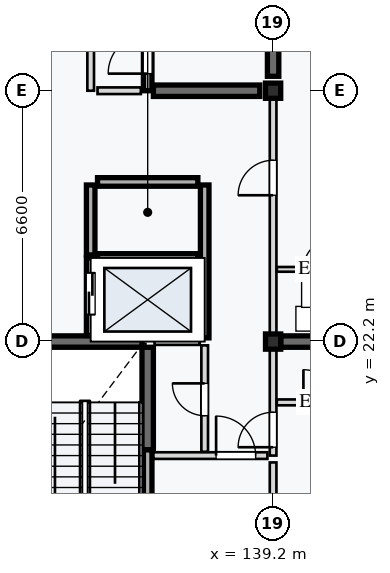
"""IFC4 building model, lengths in metres.
Left out: names, types, materials, properties, quantities, classifications, styles, units other than length and angle.
Written with IfcOpenShell. Run it as: python <this file> out.ifc"""

import sys

from ifc_helpers import new_model, si_unit, direction, frame, frame_2d, origin, origin_2d, place, context, subcontext, project, spatial, rectangle, extrude, element, fill, save


model = new_model("IFC4")
c1 = context("Model", 3, precision=1e-05, world=origin(), true_north=direction((0.0, 1.0)))
c2 = subcontext(c1, "Body", "Model", "MODEL_VIEW")
j1 = project(units=[si_unit("LENGTHUNIT", "METRE"), si_unit("PLANEANGLEUNIT", "RADIAN")], contexts=[c1])
p1 = place(None, origin())
s1 = spatial("IfcSite", under=j1, at=p1, CompositionType="ELEMENT")
p2 = place(p1, origin())
s2 = spatial("IfcBuilding", under=s1, at=p2, CompositionType="ELEMENT")
p3 = place(p2, frame((0.0, 0.0, 34.0)))
s3 = spatial("IfcBuildingStorey", under=s2, at=p3, CompositionType="ELEMENT", Elevation=34.0)
for number, where, z_axis, x_axis in (
    (1, (139.2, 22.2, 0.0), (0.0, 0.0, 1.0), (1.0, 0.0, 0.0)),
    (2, (139.2, 28.8, 0.0), (0.0, 0.0, 1.0), (1.0, 0.0, 0.0)),
):
    element("IfcColumn", number, at=place(p3, frame(where, z_axis=z_axis, x_axis=x_axis)), inside=s3, PredefinedType="COLUMN", context=c2, shape_type="SweptSolid", body=[
        extrude(rectangle(XDim=0.4, YDim=0.4, at=origin_2d()), origin(), (0.0, 0.0, 1.0), 3.2),
    ])
p4 = place(p3, frame((135.9, 19.35, 0.0), z_axis=(0.0, 0.0, 1.0), x_axis=(0.0, 1.0, 0.0)))
e3 = element("IfcWall", 3, at=p4, inside=s3, PredefinedType="SHEAR", context=c2, shape_type="SweptSolid", body=[
    extrude(rectangle(XDim=2.7, YDim=0.3, at=frame_2d((1.35, 0.0))), origin(), (0.0, 0.0, 1.0), 2.97),
])
p5 = place(p3, frame((132.95, 22.2, 0.0), z_axis=(0.0, 0.0, 1.0), x_axis=(1.0, 0.0, 0.0)))
e4 = element("IfcWall", 4, at=p5, inside=s3, PredefinedType="SHEAR", context=c2, shape_type="SweptSolid", body=[
    extrude(rectangle(XDim=2.8, YDim=0.3, at=frame_2d((1.4, 0.0))), origin(), (0.0, 0.0, 1.0), 2.97),
])
p6 = place(p3, frame((139.2, 29.18, 0.0), z_axis=(0.0, 0.0, 1.0), x_axis=(0.0, 1.0, 0.0)))
e5 = element("IfcWall", 5, at=p6, inside=s3, PredefinedType="SHEAR", context=c2, shape_type="SweptSolid", body=[
    extrude(rectangle(XDim=5.84, YDim=0.3, at=frame_2d((2.92, 0.0))), origin(), (0.0, 0.0, 1.0), 2.97),
])
p7 = place(p3, frame((136.05, 28.8, 0.0), z_axis=(0.0, 0.0, 1.0), x_axis=(1.0, 0.0, 0.0)))
e6 = element("IfcWall", 6, at=p7, inside=s3, PredefinedType="SHEAR", context=c2, shape_type="SweptSolid", body=[
    extrude(rectangle(XDim=2.8, YDim=0.3, at=frame_2d((1.4, 0.0))), origin(), (0.0, 0.0, 1.0), 2.97),
])
p8 = place(p3, frame((139.4, 22.2, 0.0), z_axis=(0.0, 0.0, 1.0), x_axis=(1.0, 0.0, 0.0)))
e7 = element("IfcWall", 7, at=p8, inside=s3, PredefinedType="SHEAR", context=c2, shape_type="SweptSolid", body=[
    extrude(rectangle(XDim=6.2, YDim=0.3, at=frame_2d((3.1, 0.0))), origin(), (0.0, 0.0, 1.0), 2.97),
])
p9 = place(p3, frame((135.9, 15.75, 0.0), z_axis=(0.0, 0.0, 1.0), x_axis=(0.0, 1.0, 0.0)))
e8 = element("IfcWall", 8, at=p9, inside=s3, PredefinedType="STANDARD", context=c2, shape_type="SweptSolid", body=[
    extrude(rectangle(XDim=3.6, YDim=0.225, at=frame_2d((1.8, 0.0))), origin(), (0.0, 0.0, 1.0), 2.935),
])
p10 = place(p9, frame((0.45, 0.0, 0.0)))
e9 = element("IfcOpeningElement", 9, at=p10, cuts=e8, PredefinedType="OPENING", context=c2, shape_type="SweptSolid", body=[
    extrude(rectangle(XDim=1.0, YDim=2.16, at=frame_2d((0.5, 1.08))), frame((0.0, 0.123, 0.0), z_axis=(0.0, -1.0, 0.0), x_axis=(1.0, 0.0, 0.0)), (0.0, 0.0, 1.0), 0.245),
])
p11 = place(p3, frame((136.05, 19.2, 0.0), z_axis=(0.0, 0.0, 1.0), x_axis=(1.0, 0.0, 0.0)))
e10 = element("IfcWall", 10, at=p11, inside=s3, PredefinedType="PARTITIONING", context=c2, shape_type="SweptSolid", body=[
    extrude(rectangle(XDim=3.0, YDim=0.175, at=frame_2d((1.5, 0.0))), origin(), (0.0, 0.0, 1.0), 2.935),
])
p12 = place(p11, frame((1.65, 0.0, 0.0)))
e11 = element("IfcOpeningElement", 11, at=p12, cuts=e10, PredefinedType="OPENING", context=c2, shape_type="SweptSolid", body=[
    extrude(rectangle(XDim=1.04, YDim=2.12, at=frame_2d((0.52, 1.06))), frame((0.0, 0.097, 0.0), z_axis=(0.0, -1.0, 0.0), x_axis=(1.0, 0.0, 0.0)), (0.0, 0.0, 1.0), 0.195),
])
p13 = place(p3, frame((137.4, 19.3, 0.0), z_axis=(0.0, 0.0, 1.0), x_axis=(0.0, 1.0, 0.0)))
e12 = element("IfcWall", 12, at=p13, inside=s3, PredefinedType="PARTITIONING", context=c2, shape_type="SweptSolid", body=[
    extrude(rectangle(XDim=2.8, YDim=0.175, at=frame_2d((1.4, 0.0))), origin(), (0.0, 0.0, 1.0), 2.935),
])
p14 = place(p13, frame((0.95, 0.0, 0.0)))
e13 = element("IfcOpeningElement", 13, at=p14, cuts=e12, PredefinedType="OPENING", context=c2, shape_type="SweptSolid", body=[
    extrude(rectangle(XDim=0.85, YDim=2.0, at=frame_2d((0.425, 1.0))), frame((0.0, 0.097, 0.0), z_axis=(0.0, -1.0, 0.0), x_axis=(1.0, 0.0, 0.0)), (0.0, 0.0, 1.0), 0.195),
])
p15 = place(p3, frame((136.08, 22.2, 0.0), z_axis=(0.0, 0.0, 1.0), x_axis=(1.0, 0.0, 0.0)))
e14 = element("IfcWall", 14, at=p15, inside=s3, PredefinedType="PARTITIONING", context=c2, shape_type="SweptSolid", body=[
    extrude(rectangle(XDim=1.19, YDim=0.175, at=frame_2d((0.595, 0.0))), origin(), (0.0, 0.0, 1.0), 2.935),
])
p16 = place(p3, frame((134.4, 22.36, 0.0), z_axis=(0.0, 0.0, 1.0), x_axis=(0.0, 1.0, 0.0)))
e15 = element("IfcWall", 15, at=p16, inside=s3, PredefinedType="STANDARD", context=c2, shape_type="SweptSolid", body=[
    extrude(rectangle(XDim=2.04, YDim=0.225, at=frame_2d((1.02, 0.0))), origin(), (0.0, 0.0, 1.0), 2.935),
])
p17 = place(p16, frame((0.55, 0.0, 0.0)))
e16 = element("IfcOpeningElement", 16, at=p17, cuts=e15, PredefinedType="OPENING", context=c2, shape_type="SweptSolid", body=[
    extrude(rectangle(XDim=1.1, YDim=2.1, at=frame_2d((0.55, 1.05))), frame((0.0, 0.123, 0.0), z_axis=(0.0, -1.0, 0.0), x_axis=(1.0, 0.0, 0.0)), (0.0, 0.0, 1.0), 0.245),
])
p18 = place(p3, frame((134.4, 24.48, 0.0), z_axis=(0.0, 0.0, 1.0), x_axis=(0.0, 1.0, 0.0)))
e17 = element("IfcWall", 17, at=p18, inside=s3, PredefinedType="STANDARD", context=c2, shape_type="SweptSolid", body=[
    extrude(rectangle(XDim=1.84, YDim=0.225, at=frame_2d((0.92, 0.0))), origin(), (0.0, 0.0, 1.0), 2.935),
])
p19 = place(p3, frame((137.4, 22.298, 0.0), z_axis=(0.0, 0.0, 1.0), x_axis=(0.0, 1.0, 0.0)))
e18 = element("IfcWall", 18, at=p19, inside=s3, PredefinedType="STANDARD", context=c2, shape_type="SweptSolid", body=[
    extrude(rectangle(XDim=4.022, YDim=0.225, at=frame_2d((2.011, 0.0))), origin(), (0.0, 0.0, 1.0), 2.935),
])
for number, where, z_axis, x_axis in (
    (19, (134.58, 24.4, 0.0), (0.0, 0.0, 1.0), (1.0, 0.0, 0.0)),
    (20, (134.58, 26.4, 0.0), (0.0, 0.0, 1.0), (1.0, 0.0, 0.0)),
):
    element("IfcWall", number, at=place(p3, frame(where, z_axis=z_axis, x_axis=x_axis)), inside=s3, PredefinedType="STANDARD", context=c2, shape_type="SweptSolid", body=[
        extrude(rectangle(XDim=2.64, YDim=0.225, at=frame_2d((1.32, 0.0))), origin(), (0.0, 0.0, 1.0), 2.935),
    ])
p20 = place(p3, frame((135.9, 28.8, 0.0), z_axis=(0.0, 0.0, 1.0), x_axis=(0.0, 1.0, 0.0)))
e21 = element("IfcWall", 21, at=p20, inside=s3, PredefinedType="STANDARD", context=c2, shape_type="SweptSolid", body=[
    extrude(rectangle(XDim=3.45, YDim=0.225, at=frame_2d((1.725, 0.0))), origin(), (0.0, 0.0, 1.0), 2.935),
])
p21 = place(p20, frame((0.45, 0.0, 0.0)))
e22 = element("IfcOpeningElement", 22, at=p21, cuts=e21, PredefinedType="OPENING", context=c2, shape_type="SweptSolid", body=[
    extrude(rectangle(XDim=1.04, YDim=2.12, at=frame_2d((0.52, 1.06))), frame((0.0, 0.123, 0.0), z_axis=(0.0, -1.0, 0.0), x_axis=(1.0, 0.0, 0.0)), (0.0, 0.0, 1.0), 0.245),
])
p22 = place(p3, frame((134.4, 28.8, 0.0), z_axis=(0.0, 0.0, 1.0), x_axis=(0.0, 1.0, 0.0)))
e23 = element("IfcWall", 23, at=p22, inside=s3, PredefinedType="PARTITIONING", context=c2, shape_type="SweptSolid", body=[
    extrude(rectangle(XDim=3.3, YDim=0.175, at=frame_2d((1.65, 0.0))), origin(), (0.0, 0.0, 1.0), 2.935),
])
p23 = place(p22, frame((1.8, 0.0, 0.0)))
e24 = element("IfcOpeningElement", 24, at=p23, cuts=e23, PredefinedType="OPENING", context=c2, shape_type="SweptSolid", body=[
    extrude(rectangle(XDim=1.0, YDim=2.1, at=frame_2d((0.5, 1.05))), frame((0.0, 0.097, 0.0), z_axis=(0.0, -1.0, 0.0), x_axis=(1.0, 0.0, 0.0)), (0.0, 0.0, 1.0), 0.195),
])
p24 = place(p3, frame((134.58, 28.8, 0.0), z_axis=(0.0, 0.0, 1.0), x_axis=(1.0, 0.0, 0.0)))
e25 = element("IfcWall", 25, at=p24, inside=s3, PredefinedType="PARTITIONING", context=c2, shape_type="SweptSolid", body=[
    extrude(rectangle(XDim=1.14, YDim=0.175, at=frame_2d((0.57, 0.0))), origin(), (0.0, 0.0, 1.0), 2.935),
])
p25 = place(p3, frame((139.2, 15.88, 0.0), z_axis=(0.0, 0.0, 1.0), x_axis=(0.0, 1.0, 0.0)))
e26 = element("IfcWall", 26, at=p25, inside=s3, PredefinedType="PARTITIONING", context=c2, shape_type="SweptSolid", body=[
    extrude(rectangle(XDim=3.14, YDim=0.175, at=frame_2d((1.57, 0.0))), origin(), (0.0, 0.0, 1.0), 2.7),
])
p26 = place(p3, frame((139.2, 19.2, 0.0), z_axis=(0.0, 0.0, 1.0), x_axis=(0.0, 1.0, 0.0)))
e27 = element("IfcWall", 27, at=p26, inside=s3, PredefinedType="PARTITIONING", context=c2, shape_type="SweptSolid", body=[
    extrude(rectangle(XDim=3.0, YDim=0.175, at=frame_2d((1.5, 0.0))), origin(), (0.0, 0.0, 1.0), 2.7),
])
p27 = place(p26, frame((0.22, 0.0, 0.0)))
e28 = element("IfcOpeningElement", 28, at=p27, cuts=e27, PredefinedType="OPENING", context=c2, shape_type="SweptSolid", body=[
    extrude(rectangle(XDim=0.92, YDim=2.14, at=frame_2d((0.46, 1.07))), frame((0.0, 0.097, 0.0), z_axis=(0.0, -1.0, 0.0), x_axis=(1.0, 0.0, 0.0)), (0.0, 0.0, 1.0), 0.195),
])
p28 = place(p3, frame((139.298, 20.6, 0.0), z_axis=(0.0, 0.0, 1.0), x_axis=(1.0, 0.0, 0.0)))
e29 = element("IfcWall", 29, at=p28, inside=s3, PredefinedType="PARTITIONING", context=c2, shape_type="SweptSolid", body=[
    extrude(rectangle(XDim=2.302, YDim=0.155, at=frame_2d((1.151, 0.0))), origin(), (0.0, 0.0, 1.0), 2.935),
])
p29 = place(p28, frame((0.7, 0.0, 0.0)))
e30 = element("IfcOpeningElement", 30, at=p29, cuts=e29, PredefinedType="OPENING", context=c2, shape_type="SweptSolid", body=[
    extrude(rectangle(XDim=0.86, YDim=2.12, at=frame_2d((0.43, 1.06))), frame((0.0, 0.087, 0.0), z_axis=(0.0, -1.0, 0.0), x_axis=(1.0, 0.0, 0.0)), (0.0, 0.0, 1.0), 0.175),
])
p30 = place(p3, frame((139.2, 22.2, 0.0), z_axis=(0.0, 0.0, 1.0), x_axis=(0.0, 1.0, 0.0)))
e31 = element("IfcWall", 31, at=p30, inside=s3, PredefinedType="PARTITIONING", context=c2, shape_type="SweptSolid", body=[
    extrude(rectangle(XDim=6.6, YDim=0.175, at=frame_2d((3.3, 0.0))), origin(), (0.0, 0.0, 1.0), 2.7),
])
p31 = place(p30, frame((3.85, 0.0, 0.0)))
e32 = element("IfcOpeningElement", 32, at=p31, cuts=e31, PredefinedType="OPENING", context=c2, shape_type="SweptSolid", body=[
    extrude(rectangle(XDim=0.92, YDim=2.14, at=frame_2d((0.46, 1.07))), frame((0.0, 0.097, 0.0), z_axis=(0.0, -1.0, 0.0), x_axis=(1.0, 0.0, 0.0)), (0.0, 0.0, 1.0), 0.195),
])
p32 = place(p3, frame((139.298, 24.1, 0.0), z_axis=(0.0, 0.0, 1.0), x_axis=(1.0, 0.0, 0.0)))
e33 = element("IfcWall", 33, at=p32, inside=s3, PredefinedType="PARTITIONING", context=c2, shape_type="SweptSolid", body=[
    extrude(rectangle(XDim=2.302, YDim=0.125, at=frame_2d((1.151, 0.0))), origin(), (0.0, 0.0, 1.0), 2.935),
])
p33 = place(p32, frame((0.7, 0.0, 0.0)))
e34 = element("IfcOpeningElement", 34, at=p33, cuts=e33, PredefinedType="OPENING", context=c2, shape_type="SweptSolid", body=[
    extrude(rectangle(XDim=0.82, YDim=2.05, at=frame_2d((0.41, 1.025))), frame((0.0, 0.073, 0.0), z_axis=(0.0, -1.0, 0.0), x_axis=(1.0, 0.0, 0.0)), (0.0, 0.0, 1.0), 0.145),
])
p34 = place(p12, origin())
e35 = element("IfcDoor", 35, at=p34, inside=s3, OperationType="SINGLE_SWING_LEFT", PredefinedType="DOOR", context=c2, shape_type="SweptSolid", body=[
    extrude(rectangle(XDim=1.04, YDim=2.12, at=frame_2d((0.52, 1.06))), frame((0.0, 0.025, 0.0), z_axis=(0.0, -1.0, 0.0), x_axis=(1.0, 0.0, 0.0)), (0.0, 0.0, 1.0), 0.05),
])
fill(e11, e35)
p35 = place(p14, origin())
e36 = element("IfcDoor", 36, at=p35, inside=s3, OperationType="SINGLE_SWING_RIGHT", PredefinedType="DOOR", context=c2, shape_type="SweptSolid", body=[
    extrude(rectangle(XDim=0.85, YDim=2.0, at=frame_2d((0.425, 1.0))), frame((0.0, 0.025, 0.0), z_axis=(0.0, -1.0, 0.0), x_axis=(1.0, 0.0, 0.0)), (0.0, 0.0, 1.0), 0.05),
])
fill(e13, e36)
p36 = place(p17, origin())
e37 = element("IfcDoor", 37, at=p36, inside=s3, OperationType="DOUBLE_DOOR_SLIDING", PredefinedType="DOOR", context=c2, shape_type="SweptSolid", body=[
    extrude(rectangle(XDim=1.1, YDim=2.1, at=frame_2d((0.55, 1.05))), frame((0.0, 0.025, 0.0), z_axis=(0.0, -1.0, 0.0), x_axis=(1.0, 0.0, 0.0)), (0.0, 0.0, 1.0), 0.05),
])
fill(e16, e37)
p37 = place(p21, origin())
e38 = element("IfcDoor", 38, at=p37, inside=s3, OperationType="SINGLE_SWING_LEFT", PredefinedType="DOOR", context=c2, shape_type="SweptSolid", body=[
    extrude(rectangle(XDim=1.04, YDim=2.12, at=frame_2d((0.52, 1.06))), frame((0.0, 0.025, 0.0), z_axis=(0.0, -1.0, 0.0), x_axis=(1.0, 0.0, 0.0)), (0.0, 0.0, 1.0), 0.05),
])
fill(e22, e38)
p38 = place(p27, origin())
e39 = element("IfcDoor", 39, at=p38, inside=s3, OperationType="SINGLE_SWING_LEFT", PredefinedType="DOOR", context=c2, shape_type="SweptSolid", body=[
    extrude(rectangle(XDim=0.92, YDim=2.14, at=frame_2d((0.46, 1.07))), frame((0.0, 0.025, 0.0), z_axis=(0.0, -1.0, 0.0), x_axis=(1.0, 0.0, 0.0)), (0.0, 0.0, 1.0), 0.05),
])
fill(e28, e39)
p39 = place(p29, origin())
e40 = element("IfcDoor", 40, at=p39, inside=s3, OperationType="SINGLE_SWING_LEFT", PredefinedType="DOOR", context=c2, shape_type="SweptSolid", body=[
    extrude(rectangle(XDim=0.86, YDim=2.12, at=frame_2d((0.43, 1.06))), frame((0.0, 0.025, 0.0), z_axis=(0.0, -1.0, 0.0), x_axis=(1.0, 0.0, 0.0)), (0.0, 0.0, 1.0), 0.05),
])
fill(e30, e40)
p40 = place(p31, origin())
e41 = element("IfcDoor", 41, at=p40, inside=s3, OperationType="SINGLE_SWING_LEFT", PredefinedType="DOOR", context=c2, shape_type="SweptSolid", body=[
    extrude(rectangle(XDim=0.92, YDim=2.14, at=frame_2d((0.46, 1.07))), frame((0.0, 0.025, 0.0), z_axis=(0.0, -1.0, 0.0), x_axis=(1.0, 0.0, 0.0)), (0.0, 0.0, 1.0), 0.05),
])
fill(e32, e41)
p41 = place(p33, origin())
e42 = element("IfcDoor", 42, at=p41, inside=s3, OperationType="SINGLE_SWING_RIGHT", PredefinedType="DOOR", context=c2, shape_type="SweptSolid", body=[
    extrude(rectangle(XDim=0.82, YDim=2.05, at=frame_2d((0.41, 1.025))), frame((0.0, 0.025, 0.0), z_axis=(0.0, -1.0, 0.0), x_axis=(1.0, 0.0, 0.0)), (0.0, 0.0, 1.0), 0.05),
])
fill(e34, e42)
save(model, sys.argv[1])
